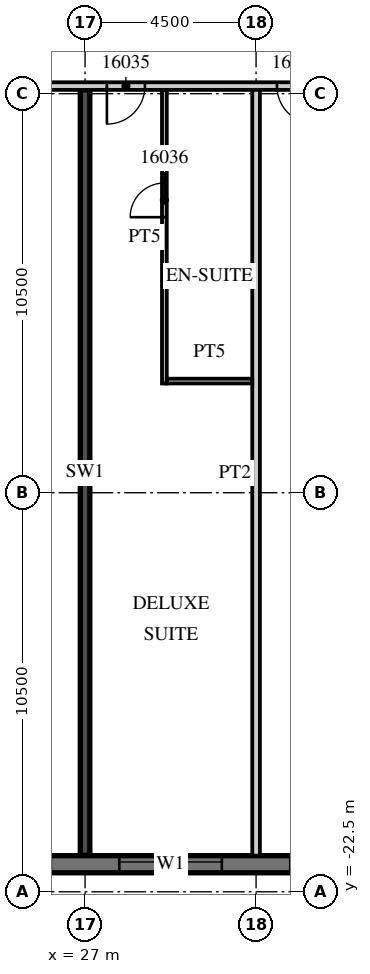
"""IFC4 building model, lengths in metres.
Left out: names, types, materials, properties, quantities, classifications, styles, units other than length and angle.
Written with IfcOpenShell. Run it as: python <this file> out.ifc"""

import sys

from ifc_helpers import new_model, si_unit, direction, frame, frame_2d, origin, place, context, subcontext, project, spatial, rectangle, extrude, element, fill, save


model = new_model("IFC4")
c1 = context("Model", 3, precision=1e-05, world=origin(), true_north=direction((0.0, 1.0)))
c2 = subcontext(c1, "Body", "Model", "MODEL_VIEW")
j1 = project(units=[si_unit("LENGTHUNIT", "METRE"), si_unit("PLANEANGLEUNIT", "RADIAN")], contexts=[c1])
p1 = place(None, origin())
s1 = spatial("IfcSite", under=j1, at=p1, CompositionType="ELEMENT")
p2 = place(p1, origin())
s2 = spatial("IfcBuilding", under=s1, at=p2, CompositionType="ELEMENT")
p3 = place(p2, frame((0.0, 0.0, 83.1)))
s3 = spatial("IfcBuildingStorey", under=s2, at=p3, CompositionType="ELEMENT", Elevation=83.1)
p4 = place(p3, frame((27.0, -21.54, 0.0), z_axis=(0.0, 0.0, 1.0), x_axis=(0.0, 1.0, 0.0)))
e1 = element("IfcWall", 1, at=p4, inside=s3, PredefinedType="SHEAR", context=c2, shape_type="SweptSolid", body=[
    extrude(rectangle(XDim=20.14, YDim=0.25, at=frame_2d((10.07, 0.0))), origin(), (0.0, 0.0, 1.0), 3.3),
])
p5 = place(p3, frame((-13.5, -21.775, 0.0), z_axis=(0.0, 0.0, 1.0), x_axis=(1.0, 0.0, 0.0)))
e2 = element("IfcWall", 2, at=p5, inside=s3, PredefinedType="SOLIDWALL", context=c2, shape_type="SweptSolid", body=[
    extrude(rectangle(XDim=54.5, YDim=0.45, at=frame_2d((27.25, 0.0))), origin(), (0.0, 0.0, 1.0), 3.02),
])
p6 = place(p5, frame((0.9, 0.0, 0.45)))
e3 = element("IfcOpeningElement", 3, at=p6, cuts=e2, PredefinedType="OPENING", context=c2, shape_type="SweptSolid", body=[
    extrude(rectangle(XDim=2.7, YDim=2.25, at=frame_2d((1.35, 1.125))), frame((0.0, 0.235, 0.0), z_axis=(0.0, -1.0, 0.0), x_axis=(1.0, 0.0, 0.0)), (0.0, 0.0, 1.0), 0.47),
])
p7 = place(p5, frame((5.4, 0.0, 0.45)))
e4 = element("IfcOpeningElement", 4, at=p7, cuts=e2, PredefinedType="OPENING", context=c2, shape_type="SweptSolid", body=[
    extrude(rectangle(XDim=2.7, YDim=2.25, at=frame_2d((1.35, 1.125))), frame((0.0, 0.235, 0.0), z_axis=(0.0, -1.0, 0.0), x_axis=(1.0, 0.0, 0.0)), (0.0, 0.0, 1.0), 0.47),
])
p8 = place(p5, frame((9.9, 0.0, 0.45)))
e5 = element("IfcOpeningElement", 5, at=p8, cuts=e2, PredefinedType="OPENING", context=c2, shape_type="SweptSolid", body=[
    extrude(rectangle(XDim=2.7, YDim=2.25, at=frame_2d((1.35, 1.125))), frame((0.0, 0.235, 0.0), z_axis=(0.0, -1.0, 0.0), x_axis=(1.0, 0.0, 0.0)), (0.0, 0.0, 1.0), 0.47),
])
p9 = place(p5, frame((14.4, 0.0, 0.45)))
e6 = element("IfcOpeningElement", 6, at=p9, cuts=e2, PredefinedType="OPENING", context=c2, shape_type="SweptSolid", body=[
    extrude(rectangle(XDim=2.7, YDim=2.25, at=frame_2d((1.35, 1.125))), frame((0.0, 0.235, 0.0), z_axis=(0.0, -1.0, 0.0), x_axis=(1.0, 0.0, 0.0)), (0.0, 0.0, 1.0), 0.47),
])
p10 = place(p5, frame((18.9, 0.0, 0.45)))
e7 = element("IfcOpeningElement", 7, at=p10, cuts=e2, PredefinedType="OPENING", context=c2, shape_type="SweptSolid", body=[
    extrude(rectangle(XDim=2.7, YDim=2.25, at=frame_2d((1.35, 1.125))), frame((0.0, 0.235, 0.0), z_axis=(0.0, -1.0, 0.0), x_axis=(1.0, 0.0, 0.0)), (0.0, 0.0, 1.0), 0.47),
])
p11 = place(p5, frame((23.4, 0.0, 0.45)))
e8 = element("IfcOpeningElement", 8, at=p11, cuts=e2, PredefinedType="OPENING", context=c2, shape_type="SweptSolid", body=[
    extrude(rectangle(XDim=2.7, YDim=2.25, at=frame_2d((1.35, 1.125))), frame((0.0, 0.235, 0.0), z_axis=(0.0, -1.0, 0.0), x_axis=(1.0, 0.0, 0.0)), (0.0, 0.0, 1.0), 0.47),
])
p12 = place(p5, frame((27.9, 0.0, 0.45)))
e9 = element("IfcOpeningElement", 9, at=p12, cuts=e2, PredefinedType="OPENING", context=c2, shape_type="SweptSolid", body=[
    extrude(rectangle(XDim=2.7, YDim=2.25, at=frame_2d((1.35, 1.125))), frame((0.0, 0.235, 0.0), z_axis=(0.0, -1.0, 0.0), x_axis=(1.0, 0.0, 0.0)), (0.0, 0.0, 1.0), 0.47),
])
p13 = place(p5, frame((32.4, 0.0, 0.45)))
e10 = element("IfcOpeningElement", 10, at=p13, cuts=e2, PredefinedType="OPENING", context=c2, shape_type="SweptSolid", body=[
    extrude(rectangle(XDim=2.7, YDim=2.25, at=frame_2d((1.35, 1.125))), frame((0.0, 0.235, 0.0), z_axis=(0.0, -1.0, 0.0), x_axis=(1.0, 0.0, 0.0)), (0.0, 0.0, 1.0), 0.47),
])
p14 = place(p5, frame((36.9, 0.0, 0.45)))
e11 = element("IfcOpeningElement", 11, at=p14, cuts=e2, PredefinedType="OPENING", context=c2, shape_type="SweptSolid", body=[
    extrude(rectangle(XDim=2.7, YDim=2.25, at=frame_2d((1.35, 1.125))), frame((0.0, 0.235, 0.0), z_axis=(0.0, -1.0, 0.0), x_axis=(1.0, 0.0, 0.0)), (0.0, 0.0, 1.0), 0.47),
])
p15 = place(p5, frame((41.4, 0.0, 0.45)))
e12 = element("IfcOpeningElement", 12, at=p15, cuts=e2, PredefinedType="OPENING", context=c2, shape_type="SweptSolid", body=[
    extrude(rectangle(XDim=2.7, YDim=2.25, at=frame_2d((1.35, 1.125))), frame((0.0, 0.235, 0.0), z_axis=(0.0, -1.0, 0.0), x_axis=(1.0, 0.0, 0.0)), (0.0, 0.0, 1.0), 0.47),
])
p16 = place(p5, frame((45.9, 0.0, 0.45)))
e13 = element("IfcOpeningElement", 13, at=p16, cuts=e2, PredefinedType="OPENING", context=c2, shape_type="SweptSolid", body=[
    extrude(rectangle(XDim=2.7, YDim=2.25, at=frame_2d((1.35, 1.125))), frame((0.0, 0.235, 0.0), z_axis=(0.0, -1.0, 0.0), x_axis=(1.0, 0.0, 0.0)), (0.0, 0.0, 1.0), 0.47),
])
p17 = place(p5, frame((50.4, 0.0, 0.45)))
e14 = element("IfcOpeningElement", 14, at=p17, cuts=e2, PredefinedType="OPENING", context=c2, shape_type="SweptSolid", body=[
    extrude(rectangle(XDim=2.7, YDim=2.25, at=frame_2d((1.35, 1.125))), frame((0.0, 0.235, 0.0), z_axis=(0.0, -1.0, 0.0), x_axis=(1.0, 0.0, 0.0)), (0.0, 0.0, 1.0), 0.47),
])
p18 = place(p3, frame((-13.5, -1.3, 0.0), z_axis=(0.0, 0.0, 1.0), x_axis=(1.0, 0.0, 0.0)))
e15 = element("IfcWall", 15, at=p18, inside=s3, PredefinedType="PARTITIONING", context=c2, shape_type="SweptSolid", body=[
    extrude(rectangle(XDim=58.05, YDim=0.2, at=frame_2d((29.025, 0.0))), origin(), (0.0, 0.0, 1.0), 3.02),
])
p19 = place(p18, frame((2.925, 0.0, 0.0)))
e16 = element("IfcOpeningElement", 16, at=p19, cuts=e15, PredefinedType="OPENING", context=c2, shape_type="SweptSolid", body=[
    extrude(rectangle(XDim=1.0, YDim=2.1, at=frame_2d((0.5, 1.05))), frame((0.0, 0.11, 0.0), z_axis=(0.0, -1.0, 0.0), x_axis=(1.0, 0.0, 0.0)), (0.0, 0.0, 1.0), 0.22),
])
p20 = place(p18, frame((7.45, 0.0, 0.0)))
e17 = element("IfcOpeningElement", 17, at=p20, cuts=e15, PredefinedType="OPENING", context=c2, shape_type="SweptSolid", body=[
    extrude(rectangle(XDim=1.0, YDim=2.1, at=frame_2d((0.5, 1.05))), frame((0.0, 0.11, 0.0), z_axis=(0.0, -1.0, 0.0), x_axis=(1.0, 0.0, 0.0)), (0.0, 0.0, 1.0), 0.22),
])
p21 = place(p18, frame((11.925, 0.0, 0.0)))
e18 = element("IfcOpeningElement", 18, at=p21, cuts=e15, PredefinedType="OPENING", context=c2, shape_type="SweptSolid", body=[
    extrude(rectangle(XDim=1.0, YDim=2.1, at=frame_2d((0.5, 1.05))), frame((0.0, 0.11, 0.0), z_axis=(0.0, -1.0, 0.0), x_axis=(1.0, 0.0, 0.0)), (0.0, 0.0, 1.0), 0.22),
])
p22 = place(p18, frame((15.938, 0.0, 0.0)))
e19 = element("IfcOpeningElement", 19, at=p22, cuts=e15, PredefinedType="OPENING", context=c2, shape_type="SweptSolid", body=[
    extrude(rectangle(XDim=1.2, YDim=2.1, at=frame_2d((0.6, 1.05))), frame((0.0, 0.11, 0.0), z_axis=(0.0, -1.0, 0.0), x_axis=(1.0, 0.0, 0.0)), (0.0, 0.0, 1.0), 0.22),
])
p23 = place(p18, frame((25.45, 0.0, 0.0)))
e20 = element("IfcOpeningElement", 20, at=p23, cuts=e15, PredefinedType="OPENING", context=c2, shape_type="SweptSolid", body=[
    extrude(rectangle(XDim=1.0, YDim=2.1, at=frame_2d((0.5, 1.05))), frame((0.0, 0.11, 0.0), z_axis=(0.0, -1.0, 0.0), x_axis=(1.0, 0.0, 0.0)), (0.0, 0.0, 1.0), 0.22),
])
p24 = place(p18, frame((29.925, 0.0, 0.0)))
e21 = element("IfcOpeningElement", 21, at=p24, cuts=e15, PredefinedType="OPENING", context=c2, shape_type="SweptSolid", body=[
    extrude(rectangle(XDim=1.0, YDim=2.1, at=frame_2d((0.5, 1.05))), frame((0.0, 0.11, 0.0), z_axis=(0.0, -1.0, 0.0), x_axis=(1.0, 0.0, 0.0)), (0.0, 0.0, 1.0), 0.22),
])
p25 = place(p18, frame((36.862, 0.0, 0.0)))
e22 = element("IfcOpeningElement", 22, at=p25, cuts=e15, PredefinedType="OPENING", context=c2, shape_type="SweptSolid", body=[
    extrude(rectangle(XDim=1.2, YDim=2.1, at=frame_2d((0.6, 1.05))), frame((0.0, 0.11, 0.0), z_axis=(0.0, -1.0, 0.0), x_axis=(1.0, 0.0, 0.0)), (0.0, 0.0, 1.0), 0.22),
])
p26 = place(p18, frame((41.075, 0.0, 0.0)))
e23 = element("IfcOpeningElement", 23, at=p26, cuts=e15, PredefinedType="OPENING", context=c2, shape_type="SweptSolid", body=[
    extrude(rectangle(XDim=1.0, YDim=2.1, at=frame_2d((0.5, 1.05))), frame((0.0, 0.11, 0.0), z_axis=(0.0, -1.0, 0.0), x_axis=(1.0, 0.0, 0.0)), (0.0, 0.0, 1.0), 0.22),
])
p27 = place(p18, frame((45.55, 0.0, 0.0)))
e24 = element("IfcOpeningElement", 24, at=p27, cuts=e15, PredefinedType="OPENING", context=c2, shape_type="SweptSolid", body=[
    extrude(rectangle(XDim=1.0, YDim=2.1, at=frame_2d((0.5, 1.05))), frame((0.0, 0.11, 0.0), z_axis=(0.0, -1.0, 0.0), x_axis=(1.0, 0.0, 0.0)), (0.0, 0.0, 1.0), 0.22),
])
p28 = place(p18, frame((52.425, 0.0, 0.0)))
e25 = element("IfcOpeningElement", 25, at=p28, cuts=e15, PredefinedType="OPENING", context=c2, shape_type="SweptSolid", body=[
    extrude(rectangle(XDim=1.0, YDim=2.1, at=frame_2d((0.5, 1.05))), frame((0.0, 0.11, 0.0), z_axis=(0.0, -1.0, 0.0), x_axis=(1.0, 0.0, 0.0)), (0.0, 0.0, 1.0), 0.22),
])
p29 = place(p18, frame((56.525, 0.0, 0.0)))
e26 = element("IfcOpeningElement", 26, at=p29, cuts=e15, PredefinedType="OPENING", context=c2, shape_type="SweptSolid", body=[
    extrude(rectangle(XDim=1.0, YDim=2.1, at=frame_2d((0.5, 1.05))), frame((0.0, 0.11, 0.0), z_axis=(0.0, -1.0, 0.0), x_axis=(1.0, 0.0, 0.0)), (0.0, 0.0, 1.0), 0.22),
])
p30 = place(p3, frame((31.5, -21.55, 0.0), z_axis=(0.0, 0.0, 1.0), x_axis=(0.0, 1.0, 0.0)))
e27 = element("IfcWall", 27, at=p30, inside=s3, PredefinedType="PARTITIONING", context=c2, shape_type="SweptSolid", body=[
    extrude(rectangle(XDim=20.15, YDim=0.2, at=frame_2d((10.075, 0.0))), origin(), (0.0, 0.0, 1.0), 3.02),
])
p31 = place(p3, frame((29.087, -9.125, 0.0), z_axis=(0.0, 0.0, 1.0), x_axis=(0.0, 1.0, 0.0)))
e28 = element("IfcWall", 28, at=p31, inside=s3, PredefinedType="PARTITIONING", context=c2, shape_type="SweptSolid", body=[
    extrude(rectangle(XDim=7.725, YDim=0.125, at=frame_2d((3.863, 0.0))), origin(), (0.0, 0.0, 1.0), 3.02),
])
p32 = place(p31, frame((4.375, 0.0, 0.0)))
e29 = element("IfcOpeningElement", 29, at=p32, cuts=e28, PredefinedType="OPENING", context=c2, shape_type="SweptSolid", body=[
    extrude(rectangle(XDim=0.9, YDim=2.1, at=frame_2d((0.45, 1.05))), frame((0.0, 0.073, 0.0), z_axis=(0.0, -1.0, 0.0), x_axis=(1.0, 0.0, 0.0)), (0.0, 0.0, 1.0), 0.145),
])
p33 = place(p3, frame((29.15, -9.062, 0.0), z_axis=(0.0, 0.0, 1.0), x_axis=(1.0, 0.0, 0.0)))
e30 = element("IfcWall", 30, at=p33, inside=s3, PredefinedType="PARTITIONING", context=c2, shape_type="SweptSolid", body=[
    extrude(rectangle(XDim=2.25, YDim=0.125, at=frame_2d((1.125, 0.0))), origin(), (0.0, 0.0, 1.0), 3.02),
])
p34 = place(p15, origin())
e31 = element("IfcWindow", 31, at=p34, inside=s3, PartitioningType="SINGLE_PANEL", PredefinedType="WINDOW", context=c2, shape_type="SweptSolid", body=[
    extrude(rectangle(XDim=2.7, YDim=2.25, at=frame_2d((1.35, 1.125))), frame((0.0, 0.09, 0.0), z_axis=(0.0, -1.0, 0.0), x_axis=(1.0, 0.0, 0.0)), (0.0, 0.0, 1.0), 0.06),
])
fill(e12, e31)
p35 = place(p26, origin())
e32 = element("IfcDoor", 32, at=p35, inside=s3, OperationType="SINGLE_SWING_LEFT", PredefinedType="DOOR", context=c2, shape_type="SweptSolid", body=[
    extrude(rectangle(XDim=1.0, YDim=2.1, at=frame_2d((0.5, 1.05))), frame((0.0, 0.025, 0.0), z_axis=(0.0, -1.0, 0.0), x_axis=(1.0, 0.0, 0.0)), (0.0, 0.0, 1.0), 0.05),
])
fill(e23, e32)
p36 = place(p32, origin())
e33 = element("IfcDoor", 33, at=p36, inside=s3, OperationType="SINGLE_SWING_LEFT", PredefinedType="DOOR", context=c2, shape_type="SweptSolid", body=[
    extrude(rectangle(XDim=0.9, YDim=2.1, at=frame_2d((0.45, 1.05))), frame((0.0, 0.025, 0.0), z_axis=(0.0, -1.0, 0.0), x_axis=(1.0, 0.0, 0.0)), (0.0, 0.0, 1.0), 0.05),
])
fill(e29, e33)
p37 = place(p27, origin())
e34 = element("IfcDoor", 34, at=p37, inside=s3, OperationType="SINGLE_SWING_RIGHT", PredefinedType="DOOR", context=c2, shape_type="SweptSolid", body=[
    extrude(rectangle(XDim=1.0, YDim=2.1, at=frame_2d((0.5, 1.05))), frame((0.0, 0.025, 0.0), z_axis=(0.0, -1.0, 0.0), x_axis=(1.0, 0.0, 0.0)), (0.0, 0.0, 1.0), 0.05),
])
fill(e24, e34)
save(model, sys.argv[1])
